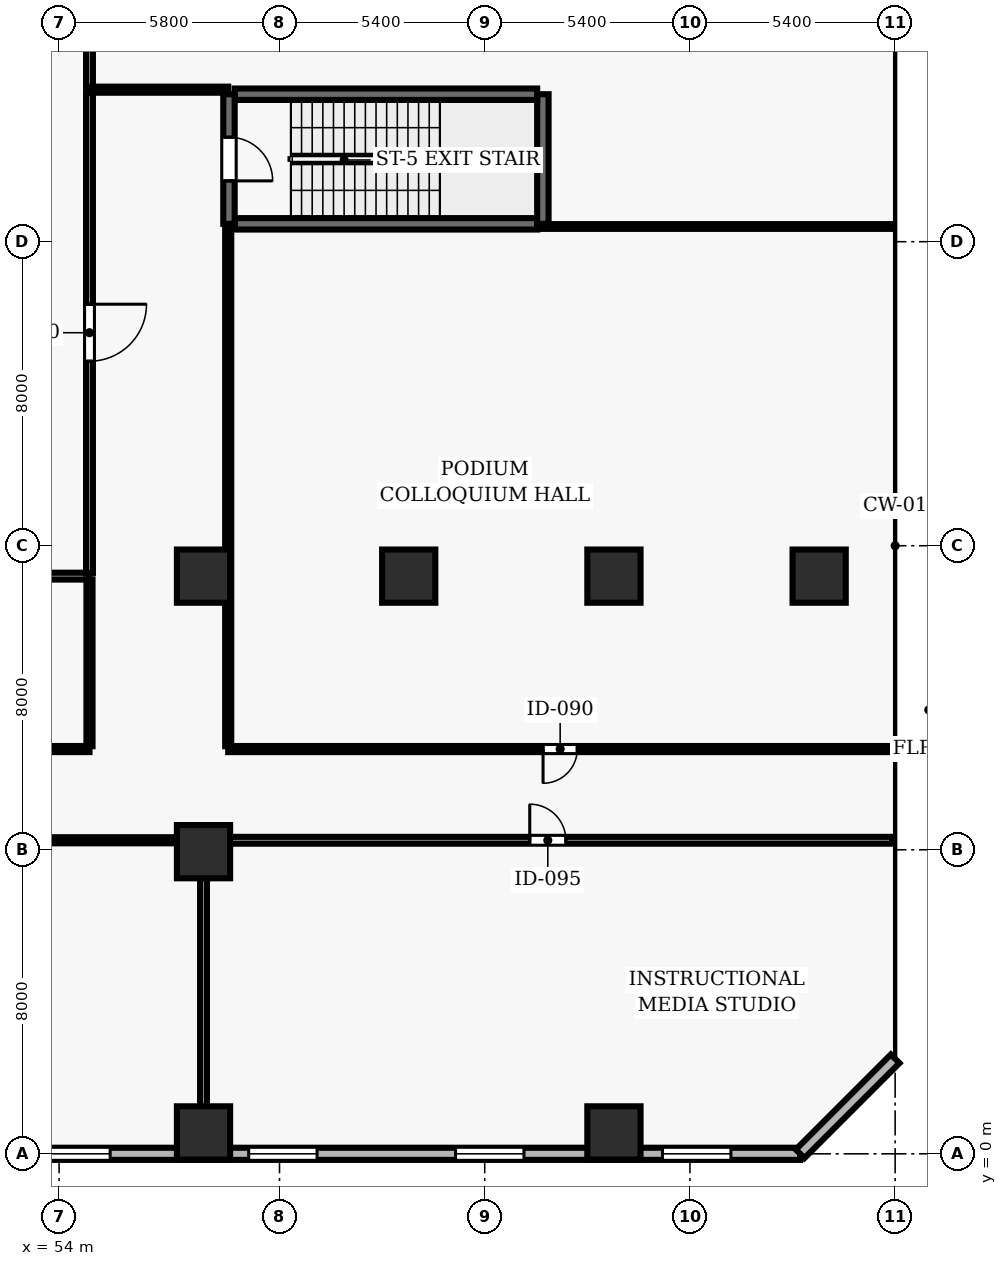
"""IFC4 building model, lengths in metres.
Left out: names, types, materials, properties, quantities, classifications, styles, units other than length and angle.
Written with IfcOpenShell. Run it as: python <this file> out.ifc"""

import sys

from ifc_helpers import new_model, si_unit, direction, frame, frame_2d, origin, origin_2d, place, context, subcontext, project, spatial, rectangle, extrude, element, fill, save


model = new_model("IFC4")
c1 = context("Model", 3, precision=1e-05, world=origin(), true_north=direction((0.0, 1.0)))
c2 = subcontext(c1, "Body", "Model", "MODEL_VIEW")
j1 = project(units=[si_unit("LENGTHUNIT", "METRE"), si_unit("PLANEANGLEUNIT", "RADIAN")], contexts=[c1])
p1 = place(None, origin())
s1 = spatial("IfcSite", under=j1, at=p1, CompositionType="ELEMENT")
p2 = place(p1, origin())
s2 = spatial("IfcBuilding", under=s1, at=p2, CompositionType="ELEMENT")
p3 = place(p2, frame((0.0, 0.0, 10.4)))
s3 = spatial("IfcBuildingStorey", under=s2, at=p3, CompositionType="ELEMENT", Elevation=10.4)
for number, where, z_axis, x_axis in (
    (1, (57.8, 0.55, 0.0), (0.0, 0.0, 1.0), (1.0, 0.0, 0.0)),
    (2, (57.8, 7.95, 0.0), (0.0, 0.0, 1.0), (1.0, 0.0, 0.0)),
    (3, (57.8, 15.2, 0.0), (0.0, 0.0, 1.0), (1.0, 0.0, 0.0)),
    (4, (63.2, 15.2, 0.0), (0.0, 0.0, 1.0), (1.0, 0.0, 0.0)),
    (5, (68.6, 0.55, 0.0), (0.0, 0.0, 1.0), (1.0, 0.0, 0.0)),
    (6, (68.6, 15.2, 0.0), (0.0, 0.0, 1.0), (1.0, 0.0, 0.0)),
    (7, (74.0, 15.2, 0.0), (0.0, 0.0, 1.0), (1.0, 0.0, 0.0)),
):
    element("IfcColumn", number, at=place(p3, frame(where, z_axis=z_axis, x_axis=x_axis)), inside=s3, PredefinedType="COLUMN", context=c2, shape_type="SweptSolid", body=[
        extrude(rectangle(XDim=1.4, YDim=1.4, at=origin_2d()), origin(), (0.0, 0.0, 1.0), 5.2),
    ])
p4 = place(p3, frame((24.5, 0.0, 0.0), z_axis=(0.0, 0.0, 1.0), x_axis=(1.0, 0.0, 0.0)))
e8 = element("IfcWall", 8, at=p4, inside=s3, PredefinedType="SOLIDWALL", context=c2, shape_type="SweptSolid", body=[
    extrude(rectangle(XDim=49.0, YDim=0.32, at=frame_2d((24.5, 0.0))), origin(), (0.0, 0.0, 1.0), 4.92),
])
p5 = place(p4, frame((1.822, 0.0, 0.9)))
e9 = element("IfcOpeningElement", 9, at=p5, cuts=e8, PredefinedType="OPENING", context=c2, shape_type="SweptSolid", body=[
    extrude(rectangle(XDim=1.8, YDim=1.6, at=frame_2d((0.9, 0.8))), frame((0.0, 0.17, 0.0), z_axis=(0.0, -1.0, 0.0), x_axis=(1.0, 0.0, 0.0)), (0.0, 0.0, 1.0), 0.34),
])
p6 = place(p4, frame((18.156, 0.0, 0.9)))
e10 = element("IfcOpeningElement", 10, at=p6, cuts=e8, PredefinedType="OPENING", context=c2, shape_type="SweptSolid", body=[
    extrude(rectangle(XDim=1.8, YDim=1.6, at=frame_2d((0.9, 0.8))), frame((0.0, 0.17, 0.0), z_axis=(0.0, -1.0, 0.0), x_axis=(1.0, 0.0, 0.0)), (0.0, 0.0, 1.0), 0.34),
])
p7 = place(p4, frame((23.6, 0.0, 0.9)))
e11 = element("IfcOpeningElement", 11, at=p7, cuts=e8, PredefinedType="OPENING", context=c2, shape_type="SweptSolid", body=[
    extrude(rectangle(XDim=1.8, YDim=1.6, at=frame_2d((0.9, 0.8))), frame((0.0, 0.17, 0.0), z_axis=(0.0, -1.0, 0.0), x_axis=(1.0, 0.0, 0.0)), (0.0, 0.0, 1.0), 0.34),
])
p8 = place(p4, frame((29.044, 0.0, 0.9)))
e12 = element("IfcOpeningElement", 12, at=p8, cuts=e8, PredefinedType="OPENING", context=c2, shape_type="SweptSolid", body=[
    extrude(rectangle(XDim=1.8, YDim=1.6, at=frame_2d((0.9, 0.8))), frame((0.0, 0.17, 0.0), z_axis=(0.0, -1.0, 0.0), x_axis=(1.0, 0.0, 0.0)), (0.0, 0.0, 1.0), 0.34),
])
p9 = place(p4, frame((34.489, 0.0, 0.9)))
e13 = element("IfcOpeningElement", 13, at=p9, cuts=e8, PredefinedType="OPENING", context=c2, shape_type="SweptSolid", body=[
    extrude(rectangle(XDim=1.8, YDim=1.6, at=frame_2d((0.9, 0.8))), frame((0.0, 0.17, 0.0), z_axis=(0.0, -1.0, 0.0), x_axis=(1.0, 0.0, 0.0)), (0.0, 0.0, 1.0), 0.34),
])
p10 = place(p4, frame((39.933, 0.0, 0.9)))
e14 = element("IfcOpeningElement", 14, at=p10, cuts=e8, PredefinedType="OPENING", context=c2, shape_type="SweptSolid", body=[
    extrude(rectangle(XDim=1.8, YDim=1.6, at=frame_2d((0.9, 0.8))), frame((0.0, 0.17, 0.0), z_axis=(0.0, -1.0, 0.0), x_axis=(1.0, 0.0, 0.0)), (0.0, 0.0, 1.0), 0.34),
])
p11 = place(p4, frame((45.378, 0.0, 0.9)))
e15 = element("IfcOpeningElement", 15, at=p11, cuts=e8, PredefinedType="OPENING", context=c2, shape_type="SweptSolid", body=[
    extrude(rectangle(XDim=1.8, YDim=1.6, at=frame_2d((0.9, 0.8))), frame((0.0, 0.17, 0.0), z_axis=(0.0, -1.0, 0.0), x_axis=(1.0, 0.0, 0.0)), (0.0, 0.0, 1.0), 0.34),
])
p12 = place(p3, frame((73.5, 0.0, 0.0), z_axis=(0.0, 0.0, 1.0), x_axis=(0.707106781187, 0.707106781187, 0.0)))
e16 = element("IfcWall", 16, at=p12, inside=s3, PredefinedType="SOLIDWALL", context=c2, shape_type="SweptSolid", body=[
    extrude(rectangle(XDim=3.536, YDim=0.32, at=frame_2d((1.768, 0.0))), origin(), (0.0, 0.0, 1.0), 4.92),
])
p13 = place(p3, frame((58.62, 24.47, 0.0), z_axis=(0.0, 0.0, 1.0), x_axis=(1.0, 0.0, 0.0)))
e17 = element("IfcWall", 17, at=p13, inside=s3, PredefinedType="SHEAR", context=c2, shape_type="SweptSolid", body=[
    extrude(rectangle(XDim=7.96, YDim=0.3, at=frame_2d((3.98, 0.0))), origin(), (0.0, 0.0, 1.0), 4.92),
])
p14 = place(p3, frame((66.73, 24.47, 0.0), z_axis=(0.0, 0.0, 1.0), x_axis=(0.0, 1.0, 0.0)))
e18 = element("IfcWall", 18, at=p14, inside=s3, PredefinedType="SHEAR", context=c2, shape_type="SweptSolid", body=[
    extrude(rectangle(XDim=3.41, YDim=0.3, at=frame_2d((1.705, 0.0))), origin(), (0.0, 0.0, 1.0), 4.92),
])
p15 = place(p3, frame((66.58, 27.88, 0.0), z_axis=(0.0, 0.0, 1.0), x_axis=(-1.0, 0.0, 0.0)))
e19 = element("IfcWall", 19, at=p15, inside=s3, PredefinedType="SHEAR", context=c2, shape_type="SweptSolid", body=[
    extrude(rectangle(XDim=7.96, YDim=0.3, at=frame_2d((3.98, 0.0))), origin(), (0.0, 0.0, 1.0), 4.92),
])
p16 = place(p3, frame((58.47, 27.88, 0.0), z_axis=(0.0, 0.0, 1.0), x_axis=(0.0, -1.0, 0.0)))
e20 = element("IfcWall", 20, at=p16, inside=s3, PredefinedType="SHEAR", context=c2, shape_type="SweptSolid", body=[
    extrude(rectangle(XDim=3.41, YDim=0.3, at=frame_2d((1.705, 0.0))), origin(), (0.0, 0.0, 1.0), 4.92),
])
p17 = place(p16, frame((1.13, 0.0, 0.0)))
e21 = element("IfcOpeningElement", 21, at=p17, cuts=e20, PredefinedType="OPENING", context=c2, shape_type="SweptSolid", body=[
    extrude(rectangle(XDim=1.15, YDim=2.15, at=frame_2d((0.575, 1.075))), frame((0.0, 0.16, 0.0), z_axis=(0.0, -1.0, 0.0), x_axis=(1.0, 0.0, 0.0)), (0.0, 0.0, 1.0), 0.32),
])
p18 = place(p3, frame((38.05, 8.25, 0.0), z_axis=(0.0, 0.0, 1.0), x_axis=(1.0, 0.0, 0.0)))
e22 = element("IfcWall", 22, at=p18, inside=s3, PredefinedType="PARTITIONING", context=c2, shape_type="SweptSolid", body=[
    extrude(rectangle(XDim=19.75, YDim=0.16, at=frame_2d((9.875, 0.0))), origin(), (0.0, 0.0, 1.0), 4.065),
])
p19 = place(p18, frame((10.075, 0.0, 0.0)))
e23 = element("IfcOpeningElement", 23, at=p19, cuts=e22, PredefinedType="OPENING", context=c2, shape_type="SweptSolid", body=[
    extrude(rectangle(XDim=1.0, YDim=2.1, at=frame_2d((0.5, 1.05))), frame((0.0, 0.09, 0.0), z_axis=(0.0, -1.0, 0.0), x_axis=(1.0, 0.0, 0.0)), (0.0, 0.0, 1.0), 0.18),
])
p20 = place(p3, frame((38.25, 15.2, 0.0), z_axis=(0.0, 0.0, 1.0), x_axis=(1.0, 0.0, 0.0)))
e24 = element("IfcWall", 24, at=p20, inside=s3, PredefinedType="PARTITIONING", context=c2, shape_type="SweptSolid", body=[
    extrude(rectangle(XDim=16.55, YDim=0.18, at=frame_2d((8.275, 0.0))), origin(), (0.0, 0.0, 1.0), 4.065),
])
p21 = place(p3, frame((54.8, 10.65, 0.0), z_axis=(0.0, 0.0, 1.0), x_axis=(-1.0, 0.0, 0.0)))
e25 = element("IfcWall", 25, at=p21, inside=s3, PredefinedType="PARTITIONING", context=c2, shape_type="SweptSolid", body=[
    extrude(rectangle(XDim=16.72, YDim=0.16, at=frame_2d((8.36, 0.0))), origin(), (0.0, 0.0, 1.0), 4.451),
])
p22 = place(p21, frame((7.91, 0.0, 0.0)))
e26 = element("IfcOpeningElement", 26, at=p22, cuts=e25, PredefinedType="OPENING", context=c2, shape_type="SweptSolid", body=[
    extrude(rectangle(XDim=0.9, YDim=2.1, at=frame_2d((0.45, 1.05))), frame((0.0, 0.09, 0.0), z_axis=(0.0, -1.0, 0.0), x_axis=(1.0, 0.0, 0.0)), (0.0, 0.0, 1.0), 0.18),
])
p23 = place(p3, frame((57.8, 8.25, 0.0), z_axis=(0.0, 0.0, 1.0), x_axis=(1.0, 0.0, 0.0)))
e27 = element("IfcWall", 27, at=p23, inside=s3, PredefinedType="PARTITIONING", context=c2, shape_type="SweptSolid", body=[
    extrude(rectangle(XDim=18.12, YDim=0.18, at=frame_2d((9.06, 0.0))), origin(), (0.0, 0.0, 1.0), 4.92),
])
p24 = place(p23, frame((8.585, 0.0, 0.0)))
e28 = element("IfcOpeningElement", 28, at=p24, cuts=e27, PredefinedType="OPENING", context=c2, shape_type="SweptSolid", body=[
    extrude(rectangle(XDim=0.95, YDim=2.1, at=frame_2d((0.475, 1.05))), frame((0.0, 0.1, 0.0), z_axis=(0.0, -1.0, 0.0), x_axis=(1.0, 0.0, 0.0)), (0.0, 0.0, 1.0), 0.2),
])
p25 = place(p3, frame((58.45, 28.0, 0.0), z_axis=(0.0, 0.0, 1.0), x_axis=(-1.0, 0.0, 0.0)))
e29 = element("IfcWall", 29, at=p25, inside=s3, PredefinedType="PARTITIONING", context=c2, shape_type="SweptSolid", body=[
    extrude(rectangle(XDim=3.65, YDim=0.16, at=frame_2d((1.825, 0.0))), origin(), (0.0, 0.0, 1.0), 4.92),
])
p26 = place(p3, frame((75.92, 10.65, 0.0), z_axis=(0.0, 0.0, 1.0), x_axis=(-1.0, 0.0, 0.0)))
e30 = element("IfcWall", 30, at=p26, inside=s3, PredefinedType="PARTITIONING", context=c2, shape_type="SweptSolid", body=[
    extrude(rectangle(XDim=17.47, YDim=0.16, at=frame_2d((8.735, 0.0))), origin(), (0.0, 0.0, 1.0), 4.451),
])
p27 = place(p26, frame((8.285, 0.0, 0.0)))
e31 = element("IfcOpeningElement", 31, at=p27, cuts=e30, PredefinedType="OPENING", context=c2, shape_type="SweptSolid", body=[
    extrude(rectangle(XDim=0.9, YDim=2.1, at=frame_2d((0.45, 1.05))), frame((0.0, 0.09, 0.0), z_axis=(0.0, -1.0, 0.0), x_axis=(1.0, 0.0, 0.0)), (0.0, 0.0, 1.0), 0.18),
])
p28 = place(p3, frame((75.92, 24.4, 0.0), z_axis=(0.0, 0.0, 1.0), x_axis=(-1.0, 0.0, 0.0)))
e32 = element("IfcWall", 32, at=p28, inside=s3, PredefinedType="PARTITIONING", context=c2, shape_type="SweptSolid", body=[
    extrude(rectangle(XDim=9.34, YDim=0.125, at=frame_2d((4.67, 0.0))), origin(), (0.0, 0.0, 1.0), 4.92),
])
p29 = place(p3, frame((54.8, 15.115, 0.0), z_axis=(0.0, 0.0, 1.0), x_axis=(0.0, -1.0, 0.0)))
e33 = element("IfcWall", 33, at=p29, inside=s3, PredefinedType="PARTITIONING", context=c2, shape_type="SweptSolid", body=[
    extrude(rectangle(XDim=4.39, YDim=0.16, at=frame_2d((2.195, 0.0))), origin(), (0.0, 0.0, 1.0), 4.92),
])
p30 = place(p3, frame((54.8, 28.075, 0.0), z_axis=(0.0, 0.0, 1.0), x_axis=(0.0, 1.0, 0.0)))
e34 = element("IfcWall", 34, at=p30, inside=s3, PredefinedType="PARTITIONING", context=c2, shape_type="SweptSolid", body=[
    extrude(rectangle(XDim=3.835, YDim=0.18, at=frame_2d((1.917, 0.0))), origin(), (0.0, 0.0, 1.0), 4.451),
])
p31 = place(p3, frame((54.8, 27.925, 0.0), z_axis=(0.0, 0.0, 1.0), x_axis=(0.0, -1.0, 0.0)))
e35 = element("IfcWall", 35, at=p31, inside=s3, PredefinedType="PARTITIONING", context=c2, shape_type="SweptSolid", body=[
    extrude(rectangle(XDim=12.64, YDim=0.18, at=frame_2d((6.32, 0.0))), origin(), (0.0, 0.0, 1.0), 4.451),
])
p32 = place(p31, frame((5.57, 0.0, 0.0)))
e36 = element("IfcOpeningElement", 36, at=p32, cuts=e35, PredefinedType="OPENING", context=c2, shape_type="SweptSolid", body=[
    extrude(rectangle(XDim=1.5, YDim=2.2, at=frame_2d((0.75, 1.1))), frame((0.0, 0.1, 0.0), z_axis=(0.0, -1.0, 0.0), x_axis=(1.0, 0.0, 0.0)), (0.0, 0.0, 1.0), 0.2),
])
p33 = place(p3, frame((57.8, 0.155, 0.0), z_axis=(0.0, 0.0, 1.0), x_axis=(0.0, 1.0, 0.0)))
e37 = element("IfcWall", 37, at=p33, inside=s3, PredefinedType="PARTITIONING", context=c2, shape_type="SweptSolid", body=[
    extrude(rectangle(XDim=8.01, YDim=0.18, at=frame_2d((4.005, 0.0))), origin(), (0.0, 0.0, 1.0), 4.065),
])
p34 = place(p3, frame((58.45, 10.725, 0.0), z_axis=(0.0, 0.0, 1.0), x_axis=(0.0, 1.0, 0.0)))
e38 = element("IfcWall", 38, at=p34, inside=s3, PredefinedType="PARTITIONING", context=c2, shape_type="SweptSolid", body=[
    extrude(rectangle(XDim=13.675, YDim=0.16, at=frame_2d((6.837, 0.0))), origin(), (0.0, 0.0, 1.0), 4.92),
])
p35 = place(p8, origin())
e39 = element("IfcWindow", 39, at=p35, inside=s3, PartitioningType="SINGLE_PANEL", PredefinedType="WINDOW", context=c2, shape_type="SweptSolid", body=[
    extrude(rectangle(XDim=1.8, YDim=1.6, at=frame_2d((0.9, 0.8))), frame((0.0, 0.03, 0.0), z_axis=(0.0, -1.0, 0.0), x_axis=(1.0, 0.0, 0.0)), (0.0, 0.0, 1.0), 0.06),
])
fill(e12, e39)
p36 = place(p9, origin())
e40 = element("IfcWindow", 40, at=p36, inside=s3, PartitioningType="SINGLE_PANEL", PredefinedType="WINDOW", context=c2, shape_type="SweptSolid", body=[
    extrude(rectangle(XDim=1.8, YDim=1.6, at=frame_2d((0.9, 0.8))), frame((0.0, 0.03, 0.0), z_axis=(0.0, -1.0, 0.0), x_axis=(1.0, 0.0, 0.0)), (0.0, 0.0, 1.0), 0.06),
])
fill(e13, e40)
p37 = place(p10, origin())
e41 = element("IfcWindow", 41, at=p37, inside=s3, PartitioningType="SINGLE_PANEL", PredefinedType="WINDOW", context=c2, shape_type="SweptSolid", body=[
    extrude(rectangle(XDim=1.8, YDim=1.6, at=frame_2d((0.9, 0.8))), frame((0.0, 0.03, 0.0), z_axis=(0.0, -1.0, 0.0), x_axis=(1.0, 0.0, 0.0)), (0.0, 0.0, 1.0), 0.06),
])
fill(e14, e41)
p38 = place(p11, origin())
e42 = element("IfcWindow", 42, at=p38, inside=s3, PartitioningType="SINGLE_PANEL", PredefinedType="WINDOW", context=c2, shape_type="SweptSolid", body=[
    extrude(rectangle(XDim=1.8, YDim=1.6, at=frame_2d((0.9, 0.8))), frame((0.0, 0.03, 0.0), z_axis=(0.0, -1.0, 0.0), x_axis=(1.0, 0.0, 0.0)), (0.0, 0.0, 1.0), 0.06),
])
fill(e15, e42)
p39 = place(p17, origin())
e43 = element("IfcDoor", 43, at=p39, inside=s3, OperationType="SINGLE_SWING_RIGHT", PredefinedType="DOOR", context=c2, shape_type="SweptSolid", body=[
    extrude(rectangle(XDim=1.15, YDim=2.15, at=frame_2d((0.575, 1.075))), frame((0.0, 0.025, 0.0), z_axis=(0.0, -1.0, 0.0), x_axis=(1.0, 0.0, 0.0)), (0.0, 0.0, 1.0), 0.05),
])
fill(e21, e43)
p40 = place(p32, origin())
e44 = element("IfcDoor", 44, at=p40, inside=s3, OperationType="SINGLE_SWING_LEFT", PredefinedType="DOOR", context=c2, shape_type="SweptSolid", body=[
    extrude(rectangle(XDim=1.5, YDim=2.2, at=frame_2d((0.75, 1.1))), frame((0.0, 0.025, 0.0), z_axis=(0.0, -1.0, 0.0), x_axis=(1.0, 0.0, 0.0)), (0.0, 0.0, 1.0), 0.05),
])
fill(e36, e44)
p41 = place(p27, origin())
e45 = element("IfcDoor", 45, at=p41, inside=s3, OperationType="SINGLE_SWING_RIGHT", PredefinedType="DOOR", context=c2, shape_type="SweptSolid", body=[
    extrude(rectangle(XDim=0.9, YDim=2.1, at=frame_2d((0.45, 1.05))), frame((0.0, 0.025, 0.0), z_axis=(0.0, -1.0, 0.0), x_axis=(1.0, 0.0, 0.0)), (0.0, 0.0, 1.0), 0.05),
])
fill(e31, e45)
p42 = place(p24, origin())
e46 = element("IfcDoor", 46, at=p42, inside=s3, OperationType="SINGLE_SWING_LEFT", PredefinedType="DOOR", context=c2, shape_type="SweptSolid", body=[
    extrude(rectangle(XDim=0.95, YDim=2.1, at=frame_2d((0.475, 1.05))), frame((0.0, 0.025, 0.0), z_axis=(0.0, -1.0, 0.0), x_axis=(1.0, 0.0, 0.0)), (0.0, 0.0, 1.0), 0.05),
])
fill(e28, e46)
save(model, sys.argv[1])
